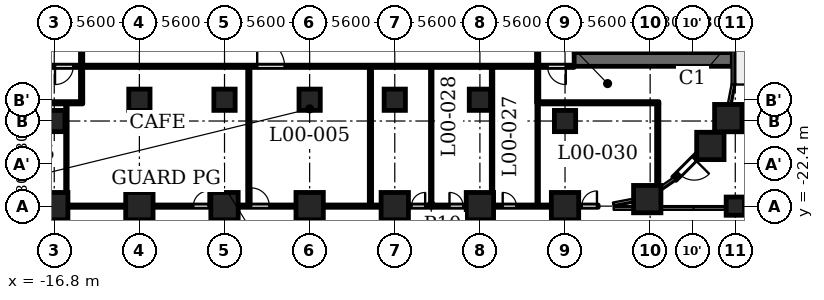
"""IFC4 building model, lengths in metres.
Left out: names, types, materials, properties, quantities, classifications, styles, units other than length and angle.
Written with IfcOpenShell. Run it as: python <this file> out.ifc"""

import sys

from ifc_helpers import new_model, si_unit, direction, frame, frame_2d, origin, origin_2d, place, context, subcontext, project, spatial, polyline, rectangle, circle, outline, extrude, element, fill, save


model = new_model("IFC4")
c1 = context("Model", 3, precision=1e-05, world=origin(), true_north=direction((0.0, 1.0)))
c2 = subcontext(c1, "Body", "Model", "MODEL_VIEW")
j1 = project(units=[si_unit("LENGTHUNIT", "METRE"), si_unit("PLANEANGLEUNIT", "RADIAN")], contexts=[c1])
p1 = place(None, origin())
s1 = spatial("IfcSite", under=j1, at=p1, CompositionType="ELEMENT")
p2 = place(p1, origin())
s2 = spatial("IfcBuilding", under=s1, at=p2, CompositionType="ELEMENT")
p3 = place(p2, origin())
s3 = spatial("IfcBuildingStorey", under=s2, at=p3, CompositionType="ELEMENT", Elevation=0.0)
for number, where, z_axis, x_axis in (
    (1, (-16.8, -22.4, 0.0), (0.0, 0.0, 1.0), (1.0, 0.0, 0.0)),
    (2, (-11.2, -22.4, 0.0), (0.0, 0.0, 1.0), (1.0, 0.0, 0.0)),
    (3, (-5.6, -22.4, 0.0), (0.0, 0.0, 1.0), (1.0, 0.0, 0.0)),
    (4, (0.0, -22.4, 0.0), (0.0, 0.0, 1.0), (1.0, 0.0, 0.0)),
    (5, (5.6, -22.4, 0.0), (0.0, 0.0, 1.0), (1.0, 0.0, 0.0)),
    (6, (11.2, -22.4, 0.0), (0.0, 0.0, 1.0), (1.0, 0.0, 0.0)),
    (7, (16.8, -22.4, 0.0), (0.0, 0.0, 1.0), (1.0, 0.0, 0.0)),
    (8, (22.209, -21.938, 0.0), (0.0, 0.0, 1.0), (1.0, 0.0, 0.0)),
    (9, (26.36, -18.44, 0.0), (0.0, 0.0, 1.0), (1.0, 0.0, 0.0)),
    (10, (27.538, -16.609, 0.0), (0.0, 0.0, 1.0), (1.0, 0.0, 0.0)),
):
    element("IfcColumn", number, at=place(p3, frame(where, z_axis=z_axis, x_axis=x_axis)), inside=s3, PredefinedType="COLUMN", context=c2, shape_type="SweptSolid", body=[
        extrude(rectangle(XDim=1.8, YDim=1.8, at=origin_2d()), origin(), (0.0, 0.0, 1.0), 6.5),
    ])
for number, where, z_axis, x_axis in (
    (11, (-16.8, -16.8, 0.0), (0.0, 0.0, 1.0), (1.0, 0.0, 0.0)),
    (12, (16.8, -16.8, 0.0), (0.0, 0.0, 1.0), (1.0, 0.0, 0.0)),
    (13, (-11.2, -15.4, 0.0), (0.0, 0.0, 1.0), (1.0, 0.0, 0.0)),
    (14, (-5.6, -15.4, 0.0), (0.0, 0.0, 1.0), (1.0, 0.0, 0.0)),
    (15, (0.0, -15.4, 0.0), (0.0, 0.0, 1.0), (1.0, 0.0, 0.0)),
    (16, (5.6, -15.4, 0.0), (0.0, 0.0, 1.0), (1.0, 0.0, 0.0)),
    (17, (11.2, -15.4, 0.0), (0.0, 0.0, 1.0), (1.0, 0.0, 0.0)),
):
    element("IfcColumn", number, at=place(p3, frame(where, z_axis=z_axis, x_axis=x_axis)), inside=s3, PredefinedType="COLUMN", context=c2, shape_type="SweptSolid", body=[
        extrude(rectangle(XDim=1.4, YDim=1.4, at=origin_2d()), origin(), (0.0, 0.0, 1.0), 6.5),
    ])
p4 = place(p3, frame((28.0, -22.4, 0.0), z_axis=(0.0, 0.0, 1.0), x_axis=(1.0, 0.0, 0.0)))
e18 = element("IfcColumn", 18, at=p4, inside=s3, PredefinedType="COLUMN", context=c2, shape_type="SweptSolid", body=[
    extrude(circle(Radius=0.6, at=origin_2d()), origin(), (0.0, 0.0, 1.0), 6.5),
])
p5 = place(p3, frame((25.617, -18.97, 0.0), z_axis=(0.0, 0.0, 1.0), x_axis=(-0.707106781187, -0.707106781187, 0.0)))
e19 = element("IfcWall", 19, at=p5, inside=s3, PredefinedType="SOLIDWALL", context=c2, shape_type="SweptSolid", body=[
    extrude(rectangle(XDim=2.3, YDim=0.3, at=frame_2d((1.15, 0.0))), origin(), (0.0, 0.0, 1.0), 5.25),
])
p6 = place(p5, frame((0.45, 0.0, 0.0)))
e20 = element("IfcOpeningElement", 20, at=p6, cuts=e19, PredefinedType="OPENING", context=c2, shape_type="SweptSolid", body=[
    extrude(rectangle(XDim=1.4, YDim=2.1, at=frame_2d((0.7, 1.05))), frame((0.0, 0.16, 0.0), z_axis=(0.0, -1.0, 0.0), x_axis=(1.0, 0.0, 0.0)), (0.0, 0.0, 1.0), 0.32),
])
p7 = place(p3, frame((17.4, -12.75, 0.0), z_axis=(0.0, 0.0, 1.0), x_axis=(1.0, 0.0, 0.0)))
e21 = element("IfcWall", 21, at=p7, inside=s3, PredefinedType="SHEAR", context=c2, shape_type="SweptSolid", body=[
    extrude(rectangle(XDim=10.4, YDim=0.9, at=frame_2d((5.2, 0.0))), origin(), (0.0, 0.0, 1.0), 6.15),
])
p8 = place(p3, frame((17.6, -12.3, 0.0), z_axis=(0.0, 0.0, 1.0), x_axis=(0.0, 1.0, 0.0)))
e22 = element("IfcWall", 22, at=p8, inside=s3, PredefinedType="SHEAR", context=c2, shape_type="SweptSolid", body=[
    extrude(rectangle(XDim=24.6, YDim=0.4, at=frame_2d((12.3, 0.0))), origin(), (0.0, 0.0, 1.0), 6.15),
])
p9 = place(p8, frame((6.0, 0.0, 0.0)))
e23 = element("IfcOpeningElement", 23, at=p9, cuts=e22, PredefinedType="OPENING", context=c2, shape_type="SweptSolid", body=[
    extrude(rectangle(XDim=1.1, YDim=2.1, at=frame_2d((0.55, 1.05))), frame((0.0, 0.21, 0.0), z_axis=(0.0, -1.0, 0.0), x_axis=(1.0, 0.0, 0.0)), (0.0, 0.0, 1.0), 0.42),
])
p10 = place(p8, frame((8.4, 0.0, 0.0)))
e24 = element("IfcOpeningElement", 24, at=p10, cuts=e22, PredefinedType="OPENING", context=c2, shape_type="SweptSolid", body=[
    extrude(rectangle(XDim=1.1, YDim=2.1, at=frame_2d((0.55, 1.05))), frame((0.0, 0.21, 0.0), z_axis=(0.0, -1.0, 0.0), x_axis=(1.0, 0.0, 0.0)), (0.0, 0.0, 1.0), 0.42),
])
p11 = place(p8, frame((10.8, 0.0, 0.0)))
e25 = element("IfcOpeningElement", 25, at=p11, cuts=e22, PredefinedType="OPENING", context=c2, shape_type="SweptSolid", body=[
    extrude(rectangle(XDim=1.1, YDim=2.1, at=frame_2d((0.55, 1.05))), frame((0.0, 0.21, 0.0), z_axis=(0.0, -1.0, 0.0), x_axis=(1.0, 0.0, 0.0)), (0.0, 0.0, 1.0), 0.42),
])
p12 = place(p8, frame((16.75, 0.0, 0.0)))
e26 = element("IfcOpeningElement", 26, at=p12, cuts=e22, PredefinedType="OPENING", context=c2, shape_type="SweptSolid", body=[
    extrude(rectangle(XDim=0.9, YDim=2.1, at=frame_2d((0.45, 1.05))), frame((0.0, 0.21, 0.0), z_axis=(0.0, -1.0, 0.0), x_axis=(1.0, 0.0, 0.0)), (0.0, 0.0, 1.0), 0.42),
])
p13 = place(p8, frame((22.8, 0.0, 0.0)))
e27 = element("IfcOpeningElement", 27, at=p13, cuts=e22, PredefinedType="OPENING", context=c2, shape_type="SweptSolid", body=[
    extrude(rectangle(XDim=1.1, YDim=2.1, at=frame_2d((0.55, 1.05))), frame((0.0, 0.21, 0.0), z_axis=(0.0, -1.0, 0.0), x_axis=(1.0, 0.0, 0.0)), (0.0, 0.0, 1.0), 0.42),
])
p14 = place(p8, frame((0.7, 0.0, 0.0)))
e28 = element("IfcOpeningElement", 28, at=p14, cuts=e22, PredefinedType="OPENING", context=c2, shape_type="SweptSolid", body=[
    extrude(rectangle(XDim=1.1, YDim=2.1, at=frame_2d((0.55, 1.05))), frame((0.0, 0.21, 0.0), z_axis=(0.0, -1.0, 0.0), x_axis=(1.0, 0.0, 0.0)), (0.0, 0.0, 1.0), 0.42),
])
p15 = place(p8, frame((12.775, 0.0, 0.0)))
e29 = element("IfcOpeningElement", 29, at=p15, cuts=e22, PredefinedType="OPENING", context=c2, shape_type="SweptSolid", body=[
    extrude(rectangle(XDim=1.8, YDim=2.1, at=frame_2d((0.9, 1.05))), frame((0.0, 0.21, 0.0), z_axis=(0.0, -1.0, 0.0), x_axis=(1.0, 0.0, 0.0)), (0.0, 0.0, 1.0), 0.42),
])
p16 = place(p3, frame((26.55, -12.3, 0.0), z_axis=(0.0, 0.0, 1.0), x_axis=(0.0, 1.0, 0.0)))
e30 = element("IfcWall", 30, at=p16, inside=s3, PredefinedType="SHEAR", context=c2, shape_type="SweptSolid", body=[
    extrude(rectangle(XDim=24.6, YDim=0.9, at=frame_2d((12.3, 0.0))), origin(), (0.0, 0.0, 1.0), 6.15),
])
p17 = place(p3, frame((23.55, -12.3, 0.0), z_axis=(0.0, 0.0, 1.0), x_axis=(0.0, 1.0, 0.0)))
e31 = element("IfcWall", 31, at=p17, inside=s3, PredefinedType="PARTITIONING", context=c2, shape_type="SweptSolid", body=[
    extrude(rectangle(XDim=2.5, YDim=0.2, at=frame_2d((1.25, 0.0))), origin(), (0.0, 0.0, 1.0), 6.15),
])
p18 = place(p17, frame((0.8, 0.0, 0.0)))
e32 = element("IfcOpeningElement", 32, at=p18, cuts=e31, PredefinedType="OPENING", context=c2, shape_type="SweptSolid", body=[
    extrude(rectangle(XDim=0.9, YDim=2.1, at=frame_2d((0.45, 1.05))), frame((0.0, 0.11, 0.0), z_axis=(0.0, -1.0, 0.0), x_axis=(1.0, 0.0, 0.0)), (0.0, 0.0, 1.0), 0.22),
])
p19 = place(p3, frame((-18.98, -22.4, 0.0), z_axis=(0.0, 0.0, 1.0), x_axis=(1.0, 0.0, 0.0)))
e33 = element("IfcWall", 33, at=p19, inside=s3, PredefinedType="PARTITIONING", context=c2, shape_type="SweptSolid", body=[
    extrude(rectangle(XDim=37.961, YDim=0.15, at=frame_2d((18.98, 0.0))), origin(), (0.0, 0.0, 1.0), 5.25),
])
p20 = place(p19, frame((15.13, 0.0, 0.0)))
e34 = element("IfcOpeningElement", 34, at=p20, cuts=e33, PredefinedType="OPENING", context=c2, shape_type="SweptSolid", body=[
    extrude(rectangle(XDim=1.2, YDim=2.1, at=frame_2d((0.6, 1.05))), frame((0.0, 0.085, 0.0), z_axis=(0.0, -1.0, 0.0), x_axis=(1.0, 0.0, 0.0)), (0.0, 0.0, 1.0), 0.17),
])
p21 = place(p19, frame((0.08, 0.0, 0.0)))
e35 = element("IfcOpeningElement", 35, at=p21, cuts=e33, PredefinedType="OPENING", context=c2, shape_type="SweptSolid", body=[
    extrude(rectangle(XDim=1.0, YDim=2.1, at=frame_2d((0.5, 1.05))), frame((0.0, 0.085, 0.0), z_axis=(0.0, -1.0, 0.0), x_axis=(1.0, 0.0, 0.0)), (0.0, 0.0, 1.0), 0.17),
])
p22 = place(p19, frame((11.33, 0.0, 0.0)))
e36 = element("IfcOpeningElement", 36, at=p22, cuts=e33, PredefinedType="OPENING", context=c2, shape_type="SweptSolid", body=[
    extrude(rectangle(XDim=1.0, YDim=2.1, at=frame_2d((0.5, 1.05))), frame((0.0, 0.085, 0.0), z_axis=(0.0, -1.0, 0.0), x_axis=(1.0, 0.0, 0.0)), (0.0, 0.0, 1.0), 0.17),
])
p23 = place(p19, frame((25.68, 0.0, 0.0)))
e37 = element("IfcOpeningElement", 37, at=p23, cuts=e33, PredefinedType="OPENING", context=c2, shape_type="SweptSolid", body=[
    extrude(rectangle(XDim=0.9, YDim=2.1, at=frame_2d((0.45, 1.05))), frame((0.0, 0.085, 0.0), z_axis=(0.0, -1.0, 0.0), x_axis=(1.0, 0.0, 0.0)), (0.0, 0.0, 1.0), 0.17),
])
p24 = place(p19, frame((28.18, 0.0, 0.0)))
e38 = element("IfcOpeningElement", 38, at=p24, cuts=e33, PredefinedType="OPENING", context=c2, shape_type="SweptSolid", body=[
    extrude(rectangle(XDim=0.9, YDim=2.1, at=frame_2d((0.45, 1.05))), frame((0.0, 0.085, 0.0), z_axis=(0.0, -1.0, 0.0), x_axis=(1.0, 0.0, 0.0)), (0.0, 0.0, 1.0), 0.17),
])
p25 = place(p19, frame((31.68, 0.0, 0.0)))
e39 = element("IfcOpeningElement", 39, at=p25, cuts=e33, PredefinedType="OPENING", context=c2, shape_type="SweptSolid", body=[
    extrude(rectangle(XDim=0.9, YDim=2.1, at=frame_2d((0.45, 1.05))), frame((0.0, 0.085, 0.0), z_axis=(0.0, -1.0, 0.0), x_axis=(1.0, 0.0, 0.0)), (0.0, 0.0, 1.0), 0.17),
])
p26 = place(p19, frame((36.881, 0.0, 0.0)))
e40 = element("IfcOpeningElement", 40, at=p26, cuts=e33, PredefinedType="OPENING", context=c2, shape_type="SweptSolid", body=[
    extrude(rectangle(XDim=1.0, YDim=2.1, at=frame_2d((0.5, 1.05))), frame((0.0, 0.085, 0.0), z_axis=(0.0, -1.0, 0.0), x_axis=(1.0, 0.0, 0.0)), (0.0, 0.0, 1.0), 0.17),
])
p27 = place(p3, frame((-22.975, -15.6, 0.0), z_axis=(0.0, 0.0, 1.0), x_axis=(1.0, 0.0, 0.0)))
e41 = element("IfcWall", 41, at=p27, inside=s3, PredefinedType="PARTITIONING", context=c2, shape_type="SweptSolid", body=[
    extrude(rectangle(XDim=8.05, YDim=0.15, at=frame_2d((4.025, 0.0))), origin(), (0.0, 0.0, 1.0), 6.15),
])
p28 = place(p3, frame((15.05, -15.6, 0.0), z_axis=(0.0, 0.0, 1.0), x_axis=(1.0, 0.0, 0.0)))
e42 = element("IfcWall", 42, at=p28, inside=s3, PredefinedType="PARTITIONING", context=c2, shape_type="SweptSolid", body=[
    extrude(rectangle(XDim=7.925, YDim=0.15, at=frame_2d((3.962, 0.0))), origin(), (0.0, 0.0, 1.0), 6.15),
])
p29 = place(p3, frame((-17.4, -13.2, 0.0), z_axis=(0.0, 0.0, 1.0), x_axis=(1.0, 0.0, 0.0)))
e43 = element("IfcWall", 43, at=p29, inside=s3, PredefinedType="PARTITIONING", context=c2, shape_type="SweptSolid", body=[
    extrude(rectangle(XDim=34.8, YDim=0.15, at=frame_2d((17.4, 0.0))), origin(), (0.0, 0.0, 1.0), 6.15),
])
p30 = place(p29, frame((13.95, 0.0, 0.0)))
e44 = element("IfcOpeningElement", 44, at=p30, cuts=e43, PredefinedType="OPENING", context=c2, shape_type="SweptSolid", body=[
    extrude(rectangle(XDim=1.8, YDim=2.1, at=frame_2d((0.9, 1.05))), frame((0.0, 0.085, 0.0), z_axis=(0.0, -1.0, 0.0), x_axis=(1.0, 0.0, 0.0)), (0.0, 0.0, 1.0), 0.17),
])
p31 = place(p29, frame((33.05, 0.0, 0.0)))
e45 = element("IfcOpeningElement", 45, at=p31, cuts=e43, PredefinedType="OPENING", context=c2, shape_type="SweptSolid", body=[
    extrude(rectangle(XDim=1.2, YDim=2.1, at=frame_2d((0.6, 1.05))), frame((0.0, 0.085, 0.0), z_axis=(0.0, -1.0, 0.0), x_axis=(1.0, 0.0, 0.0)), (0.0, 0.0, 1.0), 0.17),
])
p32 = place(p29, frame((0.65, 0.0, 0.0)))
e46 = element("IfcOpeningElement", 46, at=p32, cuts=e43, PredefinedType="OPENING", context=c2, shape_type="SweptSolid", body=[
    extrude(rectangle(XDim=1.2, YDim=2.1, at=frame_2d((0.6, 1.05))), frame((0.0, 0.085, 0.0), z_axis=(0.0, -1.0, 0.0), x_axis=(1.0, 0.0, 0.0)), (0.0, 0.0, 1.0), 0.17),
])
p33 = place(p3, frame((-16.0, -22.325, 0.0), z_axis=(0.0, 0.0, 1.0), x_axis=(0.0, 1.0, 0.0)))
e47 = element("IfcWall", 47, at=p33, inside=s3, PredefinedType="PARTITIONING", context=c2, shape_type="SweptSolid", body=[
    extrude(rectangle(XDim=6.65, YDim=0.1, at=frame_2d((3.325, 0.0))), origin(), (0.0, 0.0, 1.0), 6.15),
])
p34 = place(p3, frame((-15.0, -15.525, 0.0), z_axis=(0.0, 0.0, 1.0), x_axis=(0.0, 1.0, 0.0)))
e48 = element("IfcWall", 48, at=p34, inside=s3, PredefinedType="PARTITIONING", context=c2, shape_type="SweptSolid", body=[
    extrude(rectangle(XDim=2.25, YDim=0.15, at=frame_2d((1.125, 0.0))), origin(), (0.0, 0.0, 1.0), 6.15),
])
p35 = place(p3, frame((-15.0, -13.125, 0.0), z_axis=(0.0, 0.0, 1.0), x_axis=(0.0, 1.0, 0.0)))
e49 = element("IfcWall", 49, at=p35, inside=s3, PredefinedType="PARTITIONING", context=c2, shape_type="SweptSolid", body=[
    extrude(rectangle(XDim=6.356, YDim=0.15, at=frame_2d((3.178, 0.0))), origin(), (0.0, 0.0, 1.0), 6.15),
])
for number, where, z_axis, x_axis in (
    (50, (-4.0, -22.325, 0.0), (0.0, 0.0, 1.0), (0.0, 1.0, 0.0)),
    (51, (4.0, -22.325, 0.0), (0.0, 0.0, 1.0), (0.0, 1.0, 0.0)),
):
    element("IfcWall", number, at=place(p3, frame(where, z_axis=z_axis, x_axis=x_axis)), inside=s3, PredefinedType="PARTITIONING", context=c2, shape_type="SweptSolid", body=[
        extrude(rectangle(XDim=9.05, YDim=0.15, at=frame_2d((4.525, 0.0))), origin(), (0.0, 0.0, 1.0), 6.15),
    ])
for number, where, z_axis, x_axis in (
    (52, (8.0, -22.325, 0.0), (0.0, 0.0, 1.0), (0.0, 1.0, 0.0)),
    (53, (12.0, -22.325, 0.0), (0.0, 0.0, 1.0), (0.0, 1.0, 0.0)),
):
    element("IfcWall", number, at=place(p3, frame(where, z_axis=z_axis, x_axis=x_axis)), inside=s3, PredefinedType="PARTITIONING", context=c2, shape_type="SweptSolid", body=[
        extrude(rectangle(XDim=9.05, YDim=0.1, at=frame_2d((4.525, 0.0))), origin(), (0.0, 0.0, 1.0), 6.15),
    ])
p36 = place(p3, frame((15.0, -22.325, 0.0), z_axis=(0.0, 0.0, 1.0), x_axis=(0.0, 1.0, 0.0)))
e54 = element("IfcWall", 54, at=p36, inside=s3, PredefinedType="PARTITIONING", context=c2, shape_type="SweptSolid", body=[
    extrude(rectangle(XDim=6.725, YDim=0.1, at=frame_2d((3.362, 0.0))), origin(), (0.0, 0.0, 1.0), 6.15),
])
p37 = place(p3, frame((15.0, -15.6, 0.0), z_axis=(0.0, 0.0, 1.0), x_axis=(0.0, 1.0, 0.0)))
e55 = element("IfcWall", 55, at=p37, inside=s3, PredefinedType="PARTITIONING", context=c2, shape_type="SweptSolid", body=[
    extrude(rectangle(XDim=2.325, YDim=0.15, at=frame_2d((1.163, 0.0))), origin(), (0.0, 0.0, 1.0), 6.15),
])
p38 = place(p3, frame((15.0, -13.125, 0.0), z_axis=(0.0, 0.0, 1.0), x_axis=(0.0, 1.0, 0.0)))
e56 = element("IfcWall", 56, at=p38, inside=s3, PredefinedType="PARTITIONING", context=c2, shape_type="SweptSolid", body=[
    extrude(rectangle(XDim=6.356, YDim=0.15, at=frame_2d((3.178, 0.0))), origin(), (0.0, 0.0, 1.0), 6.15),
])
p39 = place(p3, frame((22.9, -21.37, 0.0), z_axis=(0.0, 0.0, 1.0), x_axis=(0.0, 1.0, 0.0)))
e57 = element("IfcWall", 57, at=p39, inside=s3, PredefinedType="PARTITIONING", context=c2, shape_type="SweptSolid", body=[
    extrude(rectangle(XDim=5.695, YDim=0.15, at=frame_2d((2.848, 0.0))), origin(), (0.0, 0.0, 1.0), 6.15),
])
p40 = place(p3, origin())
e58 = element("IfcWall", 58, at=p40, inside=s3, PredefinedType="SOLIDWALL", context=c2, shape_type="SweptSolid", body=[
    extrude(outline(polyline([(19.944, -22.105), (19.001, -22.285), (19.001, -22.7), (20.0, -22.7), (20.0, -22.4), (19.944, -22.105)])), origin(), (0.0, 0.0, 1.0), 5.25),
])
p41 = place(p6, origin())
e59 = element("IfcDoor", 59, at=p41, inside=s3, OperationType="SINGLE_SWING_LEFT", PredefinedType="DOOR", context=c2, shape_type="SweptSolid", body=[
    extrude(rectangle(XDim=1.4, YDim=2.1, at=frame_2d((0.7, 1.05))), frame((0.0, 0.025, 0.0), z_axis=(0.0, -1.0, 0.0), x_axis=(1.0, 0.0, 0.0)), (0.0, 0.0, 1.0), 0.05),
])
fill(e20, e59)
p42 = place(p30, origin())
e60 = element("IfcDoor", 60, at=p42, inside=s3, OperationType="SINGLE_SWING_RIGHT", PredefinedType="DOOR", context=c2, shape_type="SweptSolid", body=[
    extrude(rectangle(XDim=1.8, YDim=2.1, at=frame_2d((0.9, 1.05))), frame((0.0, 0.025, 0.0), z_axis=(0.0, -1.0, 0.0), x_axis=(1.0, 0.0, 0.0)), (0.0, 0.0, 1.0), 0.05),
])
fill(e44, e60)
p43 = place(p20, origin())
e61 = element("IfcDoor", 61, at=p43, inside=s3, OperationType="SINGLE_SWING_RIGHT", PredefinedType="DOOR", context=c2, shape_type="SweptSolid", body=[
    extrude(rectangle(XDim=1.2, YDim=2.1, at=frame_2d((0.6, 1.05))), frame((0.0, 0.025, 0.0), z_axis=(0.0, -1.0, 0.0), x_axis=(1.0, 0.0, 0.0)), (0.0, 0.0, 1.0), 0.05),
])
fill(e34, e61)
p44 = place(p31, origin())
e62 = element("IfcDoor", 62, at=p44, inside=s3, OperationType="SINGLE_SWING_RIGHT", PredefinedType="DOOR", context=c2, shape_type="SweptSolid", body=[
    extrude(rectangle(XDim=1.2, YDim=2.1, at=frame_2d((0.6, 1.05))), frame((0.0, 0.025, 0.0), z_axis=(0.0, -1.0, 0.0), x_axis=(1.0, 0.0, 0.0)), (0.0, 0.0, 1.0), 0.05),
])
fill(e45, e62)
p45 = place(p32, origin())
e63 = element("IfcDoor", 63, at=p45, inside=s3, OperationType="SINGLE_SWING_LEFT", PredefinedType="DOOR", context=c2, shape_type="SweptSolid", body=[
    extrude(rectangle(XDim=1.2, YDim=2.1, at=frame_2d((0.6, 1.05))), frame((0.0, 0.025, 0.0), z_axis=(0.0, -1.0, 0.0), x_axis=(1.0, 0.0, 0.0)), (0.0, 0.0, 1.0), 0.05),
])
fill(e46, e63)
p46 = place(p22, origin())
e64 = element("IfcDoor", 64, at=p46, inside=s3, OperationType="SINGLE_SWING_LEFT", PredefinedType="DOOR", context=c2, shape_type="SweptSolid", body=[
    extrude(rectangle(XDim=1.0, YDim=2.1, at=frame_2d((0.5, 1.05))), frame((0.0, 0.025, 0.0), z_axis=(0.0, -1.0, 0.0), x_axis=(1.0, 0.0, 0.0)), (0.0, 0.0, 1.0), 0.05),
])
fill(e36, e64)
p47 = place(p23, origin())
e65 = element("IfcDoor", 65, at=p47, inside=s3, OperationType="SINGLE_SWING_LEFT", PredefinedType="DOOR", context=c2, shape_type="SweptSolid", body=[
    extrude(rectangle(XDim=0.9, YDim=2.1, at=frame_2d((0.45, 1.05))), frame((0.0, 0.025, 0.0), z_axis=(0.0, -1.0, 0.0), x_axis=(1.0, 0.0, 0.0)), (0.0, 0.0, 1.0), 0.05),
])
fill(e37, e65)
p48 = place(p24, origin())
e66 = element("IfcDoor", 66, at=p48, inside=s3, OperationType="SINGLE_SWING_RIGHT", PredefinedType="DOOR", context=c2, shape_type="SweptSolid", body=[
    extrude(rectangle(XDim=0.9, YDim=2.1, at=frame_2d((0.45, 1.05))), frame((0.0, 0.025, 0.0), z_axis=(0.0, -1.0, 0.0), x_axis=(1.0, 0.0, 0.0)), (0.0, 0.0, 1.0), 0.05),
])
fill(e38, e66)
p49 = place(p25, origin())
e67 = element("IfcDoor", 67, at=p49, inside=s3, OperationType="SINGLE_SWING_RIGHT", PredefinedType="DOOR", context=c2, shape_type="SweptSolid", body=[
    extrude(rectangle(XDim=0.9, YDim=2.1, at=frame_2d((0.45, 1.05))), frame((0.0, 0.025, 0.0), z_axis=(0.0, -1.0, 0.0), x_axis=(1.0, 0.0, 0.0)), (0.0, 0.0, 1.0), 0.05),
])
fill(e39, e67)
p50 = place(p26, origin())
e68 = element("IfcDoor", 68, at=p50, inside=s3, OperationType="SINGLE_SWING_LEFT", PredefinedType="DOOR", context=c2, shape_type="SweptSolid", body=[
    extrude(rectangle(XDim=1.0, YDim=2.1, at=frame_2d((0.5, 1.05))), frame((0.0, 0.025, 0.0), z_axis=(0.0, -1.0, 0.0), x_axis=(1.0, 0.0, 0.0)), (0.0, 0.0, 1.0), 0.05),
])
fill(e40, e68)
save(model, sys.argv[1])
